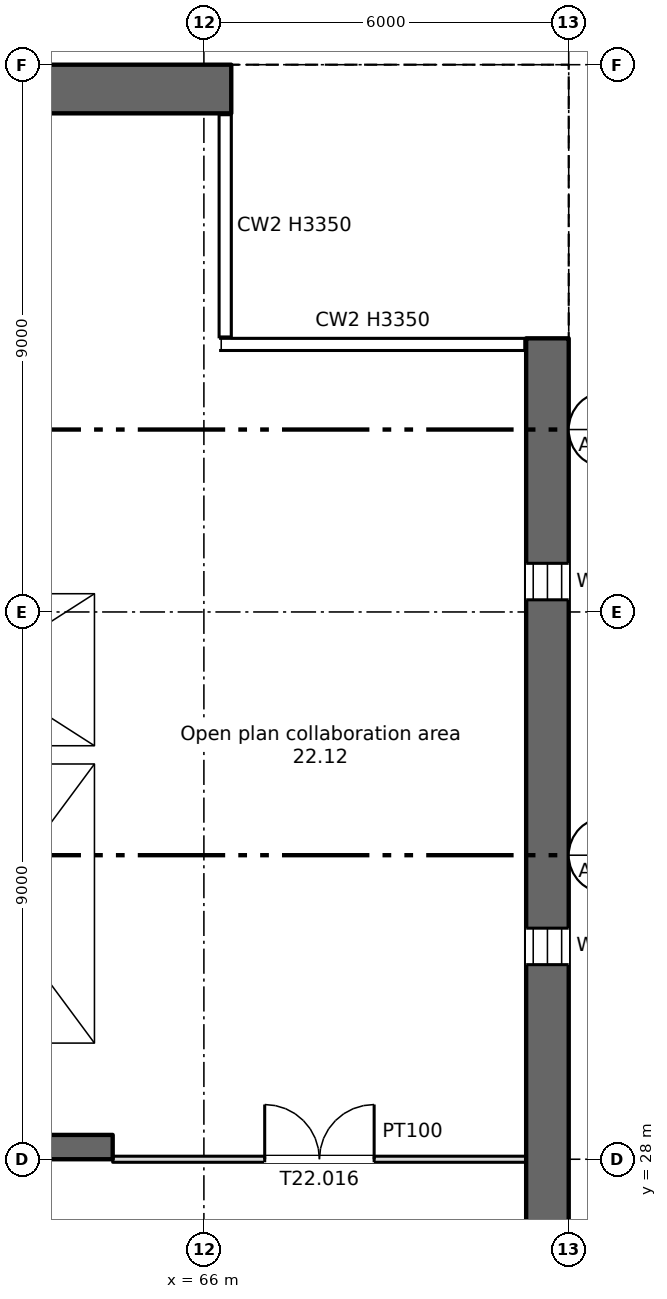
"""IFC4 building model, lengths in metres.
Left out: names, types, materials, properties, quantities, classifications, styles, units other than length and angle.
Written with IfcOpenShell. Run it as: python <this file> out.ifc"""

import sys

from ifc_helpers import new_model, si_unit, direction, frame, frame_2d, origin, place, context, subcontext, project, spatial, rectangle, extrude, element, fill, save


model = new_model("IFC4")
c1 = context("Model", 3, precision=1e-05, world=origin(), true_north=direction((0.0, 1.0)))
c2 = subcontext(c1, "Body", "Model", "MODEL_VIEW")
j1 = project(units=[si_unit("LENGTHUNIT", "METRE"), si_unit("PLANEANGLEUNIT", "RADIAN")], contexts=[c1])
p1 = place(None, origin())
s1 = spatial("IfcSite", under=j1, at=p1, CompositionType="ELEMENT")
p2 = place(p1, origin())
s2 = spatial("IfcBuilding", under=s1, at=p2, CompositionType="ELEMENT")
p3 = place(p2, frame((0.0, 0.0, 143.75)))
s3 = spatial("IfcBuildingStorey", under=s2, at=p3, CompositionType="ELEMENT", Elevation=143.75)
p4 = place(p3, frame((71.65, 6.0, 0.0), z_axis=(0.0, 0.0, 1.0), x_axis=(0.0, 1.0, 0.0)))
e1 = element("IfcWall", 1, at=p4, inside=s3, PredefinedType="SHEAR", context=c2, shape_type="SweptSolid", body=[
    extrude(rectangle(XDim=35.5, YDim=0.7, at=frame_2d((17.75, 0.0))), origin(), (0.0, 0.0, 1.0), 3.35),
])
p5 = place(p4, frame((1.2, 0.0, 0.6)))
e2 = element("IfcOpeningElement", 2, at=p5, cuts=e1, PredefinedType="OPENING", context=c2, shape_type="SweptSolid", body=[
    extrude(rectangle(XDim=0.6, YDim=2.4, at=frame_2d((0.3, 1.2))), frame((0.0, 0.36, 0.0), z_axis=(0.0, -1.0, 0.0), x_axis=(1.0, 0.0, 0.0)), (0.0, 0.0, 1.0), 0.72),
])
p6 = place(p4, frame((7.2, 0.0, 0.6)))
e3 = element("IfcOpeningElement", 3, at=p6, cuts=e1, PredefinedType="OPENING", context=c2, shape_type="SweptSolid", body=[
    extrude(rectangle(XDim=0.6, YDim=2.4, at=frame_2d((0.3, 1.2))), frame((0.0, 0.36, 0.0), z_axis=(0.0, -1.0, 0.0), x_axis=(1.0, 0.0, 0.0)), (0.0, 0.0, 1.0), 0.72),
])
p7 = place(p4, frame((13.2, 0.0, 0.6)))
e4 = element("IfcOpeningElement", 4, at=p7, cuts=e1, PredefinedType="OPENING", context=c2, shape_type="SweptSolid", body=[
    extrude(rectangle(XDim=0.6, YDim=2.4, at=frame_2d((0.3, 1.2))), frame((0.0, 0.36, 0.0), z_axis=(0.0, -1.0, 0.0), x_axis=(1.0, 0.0, 0.0)), (0.0, 0.0, 1.0), 0.72),
])
p8 = place(p4, frame((19.2, 0.0, 0.6)))
e5 = element("IfcOpeningElement", 5, at=p8, cuts=e1, PredefinedType="OPENING", context=c2, shape_type="SweptSolid", body=[
    extrude(rectangle(XDim=0.6, YDim=2.4, at=frame_2d((0.3, 1.2))), frame((0.0, 0.36, 0.0), z_axis=(0.0, -1.0, 0.0), x_axis=(1.0, 0.0, 0.0)), (0.0, 0.0, 1.0), 0.72),
])
p9 = place(p4, frame((25.2, 0.0, 0.6)))
e6 = element("IfcOpeningElement", 6, at=p9, cuts=e1, PredefinedType="OPENING", context=c2, shape_type="SweptSolid", body=[
    extrude(rectangle(XDim=0.6, YDim=2.4, at=frame_2d((0.3, 1.2))), frame((0.0, 0.36, 0.0), z_axis=(0.0, -1.0, 0.0), x_axis=(1.0, 0.0, 0.0)), (0.0, 0.0, 1.0), 0.72),
])
p10 = place(p4, frame((31.2, 0.0, 0.6)))
e7 = element("IfcOpeningElement", 7, at=p10, cuts=e1, PredefinedType="OPENING", context=c2, shape_type="SweptSolid", body=[
    extrude(rectangle(XDim=0.6, YDim=2.4, at=frame_2d((0.3, 1.2))), frame((0.0, 0.36, 0.0), z_axis=(0.0, -1.0, 0.0), x_axis=(1.0, 0.0, 0.0)), (0.0, 0.0, 1.0), 0.72),
])
p11 = place(p3, frame((5.55, 45.6, 0.0), z_axis=(0.0, 0.0, 1.0), x_axis=(1.0, 0.0, 0.0)))
e8 = element("IfcWall", 8, at=p11, inside=s3, PredefinedType="SHEAR", context=c2, shape_type="SweptSolid", body=[
    extrude(rectangle(XDim=60.9, YDim=0.8, at=frame_2d((30.45, 0.0))), origin(), (0.0, 0.0, 1.0), 3.35),
])
p12 = place(p11, frame((1.2, 0.0, 0.6)))
e9 = element("IfcOpeningElement", 9, at=p12, cuts=e8, PredefinedType="OPENING", context=c2, shape_type="SweptSolid", body=[
    extrude(rectangle(XDim=0.6, YDim=2.4, at=frame_2d((0.3, 1.2))), frame((0.0, 0.41, 0.0), z_axis=(0.0, -1.0, 0.0), x_axis=(1.0, 0.0, 0.0)), (0.0, 0.0, 1.0), 0.82),
])
p13 = place(p11, frame((7.2, 0.0, 0.6)))
e10 = element("IfcOpeningElement", 10, at=p13, cuts=e8, PredefinedType="OPENING", context=c2, shape_type="SweptSolid", body=[
    extrude(rectangle(XDim=0.6, YDim=2.4, at=frame_2d((0.3, 1.2))), frame((0.0, 0.41, 0.0), z_axis=(0.0, -1.0, 0.0), x_axis=(1.0, 0.0, 0.0)), (0.0, 0.0, 1.0), 0.82),
])
p14 = place(p3, frame((6.7, 28.2, 0.0), z_axis=(0.0, 0.0, 1.0), x_axis=(1.0, 0.0, 0.0)))
e11 = element("IfcWall", 11, at=p14, inside=s3, PredefinedType="SHEAR", context=c2, shape_type="SweptSolid", body=[
    extrude(rectangle(XDim=57.8, YDim=0.4, at=frame_2d((28.9, 0.0))), origin(), (0.0, 0.0, 1.0), 3.35),
])
p15 = place(p14, frame((13.85, 0.0, 0.0)))
e12 = element("IfcOpeningElement", 12, at=p15, cuts=e11, PredefinedType="OPENING", context=c2, shape_type="SweptSolid", body=[
    extrude(rectangle(XDim=0.9, YDim=2.1, at=frame_2d((0.45, 1.05))), frame((0.0, 0.21, 0.0), z_axis=(0.0, -1.0, 0.0), x_axis=(1.0, 0.0, 0.0)), (0.0, 0.0, 1.0), 0.42),
])
p16 = place(p14, frame((48.562, 0.0, 0.0)))
e13 = element("IfcOpeningElement", 13, at=p16, cuts=e11, PredefinedType="OPENING", context=c2, shape_type="SweptSolid", body=[
    extrude(rectangle(XDim=0.9, YDim=2.1, at=frame_2d((0.45, 1.05))), frame((0.0, 0.21, 0.0), z_axis=(0.0, -1.0, 0.0), x_axis=(1.0, 0.0, 0.0)), (0.0, 0.0, 1.0), 0.42),
])
p17 = place(p14, frame((51.137, 0.0, 0.0)))
e14 = element("IfcOpeningElement", 14, at=p17, cuts=e11, PredefinedType="OPENING", context=c2, shape_type="SweptSolid", body=[
    extrude(rectangle(XDim=0.9, YDim=2.1, at=frame_2d((0.45, 1.05))), frame((0.0, 0.21, 0.0), z_axis=(0.0, -1.0, 0.0), x_axis=(1.0, 0.0, 0.0)), (0.0, 0.0, 1.0), 0.42),
])
p18 = place(p14, frame((1.35, 0.0, 0.0)))
e15 = element("IfcOpeningElement", 15, at=p18, cuts=e11, PredefinedType="OPENING", context=c2, shape_type="SweptSolid", body=[
    extrude(rectangle(XDim=0.9, YDim=2.1, at=frame_2d((0.45, 1.05))), frame((0.0, 0.21, 0.0), z_axis=(0.0, -1.0, 0.0), x_axis=(1.0, 0.0, 0.0)), (0.0, 0.0, 1.0), 0.42),
])
p19 = place(p14, frame((4.7, 0.0, 0.0)))
e16 = element("IfcOpeningElement", 16, at=p19, cuts=e11, PredefinedType="OPENING", context=c2, shape_type="SweptSolid", body=[
    extrude(rectangle(XDim=1.2, YDim=2.1, at=frame_2d((0.6, 1.05))), frame((0.0, 0.21, 0.0), z_axis=(0.0, -1.0, 0.0), x_axis=(1.0, 0.0, 0.0)), (0.0, 0.0, 1.0), 0.42),
])
p20 = place(p14, frame((31.7, 0.0, 0.0)))
e17 = element("IfcOpeningElement", 17, at=p20, cuts=e11, PredefinedType="OPENING", context=c2, shape_type="SweptSolid", body=[
    extrude(rectangle(XDim=1.2, YDim=2.1, at=frame_2d((0.6, 1.05))), frame((0.0, 0.21, 0.0), z_axis=(0.0, -1.0, 0.0), x_axis=(1.0, 0.0, 0.0)), (0.0, 0.0, 1.0), 0.42),
])
p21 = place(p14, frame((55.2, 0.0, 0.0)))
e18 = element("IfcOpeningElement", 18, at=p21, cuts=e11, PredefinedType="OPENING", context=c2, shape_type="SweptSolid", body=[
    extrude(rectangle(XDim=1.2, YDim=2.1, at=frame_2d((0.6, 1.05))), frame((0.0, 0.21, 0.0), z_axis=(0.0, -1.0, 0.0), x_axis=(1.0, 0.0, 0.0)), (0.0, 0.0, 1.0), 0.42),
])
p22 = place(p14, frame((21.7, 0.0, 0.0)))
e19 = element("IfcOpeningElement", 19, at=p22, cuts=e11, PredefinedType="OPENING", context=c2, shape_type="SweptSolid", body=[
    extrude(rectangle(XDim=1.2, YDim=2.1, at=frame_2d((0.6, 1.05))), frame((0.0, 0.21, 0.0), z_axis=(0.0, -1.0, 0.0), x_axis=(1.0, 0.0, 0.0)), (0.0, 0.0, 1.0), 0.42),
])
p23 = place(p14, frame((41.7, 0.0, 0.0)))
e20 = element("IfcOpeningElement", 20, at=p23, cuts=e11, PredefinedType="OPENING", context=c2, shape_type="SweptSolid", body=[
    extrude(rectangle(XDim=1.2, YDim=2.1, at=frame_2d((0.6, 1.05))), frame((0.0, 0.21, 0.0), z_axis=(0.0, -1.0, 0.0), x_axis=(1.0, 0.0, 0.0)), (0.0, 0.0, 1.0), 0.42),
])
p24 = place(p14, frame((24.85, 0.0, 0.0)))
e21 = element("IfcOpeningElement", 21, at=p24, cuts=e11, PredefinedType="OPENING", context=c2, shape_type="SweptSolid", body=[
    extrude(rectangle(XDim=2.4, YDim=2.1, at=frame_2d((1.2, 1.05))), frame((0.0, 0.21, 0.0), z_axis=(0.0, -1.0, 0.0), x_axis=(1.0, 0.0, 0.0)), (0.0, 0.0, 1.0), 0.42),
])
p25 = place(p14, frame((37.35, 0.0, 0.0)))
e22 = element("IfcOpeningElement", 22, at=p25, cuts=e11, PredefinedType="OPENING", context=c2, shape_type="SweptSolid", body=[
    extrude(rectangle(XDim=2.4, YDim=2.1, at=frame_2d((1.2, 1.05))), frame((0.0, 0.21, 0.0), z_axis=(0.0, -1.0, 0.0), x_axis=(1.0, 0.0, 0.0)), (0.0, 0.0, 1.0), 0.42),
])
p26 = place(p14, frame((7.95, 0.0, 0.0)))
e23 = element("IfcOpeningElement", 23, at=p26, cuts=e11, PredefinedType="OPENING", context=c2, shape_type="SweptSolid", body=[
    extrude(rectangle(XDim=2.4, YDim=2.1, at=frame_2d((1.2, 1.05))), frame((0.0, 0.21, 0.0), z_axis=(0.0, -1.0, 0.0), x_axis=(1.0, 0.0, 0.0)), (0.0, 0.0, 1.0), 0.42),
])
p27 = place(p14, frame((28.85, 0.0, 0.0)))
e24 = element("IfcOpeningElement", 24, at=p27, cuts=e11, PredefinedType="OPENING", context=c2, shape_type="SweptSolid", body=[
    extrude(rectangle(XDim=0.9, YDim=2.1, at=frame_2d((0.45, 1.05))), frame((0.0, 0.21, 0.0), z_axis=(0.0, -1.0, 0.0), x_axis=(1.0, 0.0, 0.0)), (0.0, 0.0, 1.0), 0.42),
])
p28 = place(p14, frame((34.85, 0.0, 0.0)))
e25 = element("IfcOpeningElement", 25, at=p28, cuts=e11, PredefinedType="OPENING", context=c2, shape_type="SweptSolid", body=[
    extrude(rectangle(XDim=0.9, YDim=2.1, at=frame_2d((0.45, 1.05))), frame((0.0, 0.21, 0.0), z_axis=(0.0, -1.0, 0.0), x_axis=(1.0, 0.0, 0.0)), (0.0, 0.0, 1.0), 0.42),
])
p29 = place(p3, frame((64.35, 34.8, 0.0), z_axis=(0.0, 0.0, 1.0), x_axis=(0.0, 1.0, 0.0)))
e26 = element("IfcWall", 26, at=p29, inside=s3, PredefinedType="SHEAR", context=c2, shape_type="SweptSolid", body=[
    extrude(rectangle(XDim=10.4, YDim=0.3, at=frame_2d((5.2, 0.0))), origin(), (0.0, 0.0, 1.0), 3.35),
])
p30 = place(p3, frame((64.35, 28.4, 0.0), z_axis=(0.0, 0.0, 1.0), x_axis=(0.0, 1.0, 0.0)))
e27 = element("IfcWall", 27, at=p30, inside=s3, PredefinedType="SHEAR", context=c2, shape_type="SweptSolid", body=[
    extrude(rectangle(XDim=6.1, YDim=0.3, at=frame_2d((3.05, 0.0))), origin(), (0.0, 0.0, 1.0), 3.35),
])
p31 = place(p3, frame((60.3, 34.65, 0.0), z_axis=(0.0, 0.0, 1.0), x_axis=(1.0, 0.0, 0.0)))
e28 = element("IfcWall", 28, at=p31, inside=s3, PredefinedType="SHEAR", context=c2, shape_type="SweptSolid", body=[
    extrude(rectangle(XDim=4.2, YDim=0.3, at=frame_2d((2.1, 0.0))), origin(), (0.0, 0.0, 1.0), 3.35),
])
p32 = place(p3, frame((60.3, 37.45, 0.0), z_axis=(0.0, 0.0, 1.0), x_axis=(1.0, 0.0, 0.0)))
e29 = element("IfcWall", 29, at=p32, inside=s3, PredefinedType="SHEAR", context=c2, shape_type="SweptSolid", body=[
    extrude(rectangle(XDim=3.9, YDim=0.3, at=frame_2d((1.95, 0.0))), origin(), (0.0, 0.0, 1.0), 3.35),
])
p33 = place(p32, frame((1.4, 0.0, 0.0)))
e30 = element("IfcOpeningElement", 30, at=p33, cuts=e29, PredefinedType="OPENING", context=c2, shape_type="SweptSolid", body=[
    extrude(rectangle(XDim=1.1, YDim=2.1, at=frame_2d((0.55, 1.05))), frame((0.0, 0.16, 0.0), z_axis=(0.0, -1.0, 0.0), x_axis=(1.0, 0.0, 0.0)), (0.0, 0.0, 1.0), 0.32),
])
p34 = place(p3, frame((64.5, 28.0, 0.0), z_axis=(0.0, 0.0, 1.0), x_axis=(1.0, 0.0, 0.0)))
e31 = element("IfcWall", 31, at=p34, inside=s3, PredefinedType="PARTITIONING", context=c2, shape_type="SweptSolid", body=[
    extrude(rectangle(XDim=6.8, YDim=0.1, at=frame_2d((3.4, 0.0))), origin(), (0.0, 0.0, 1.0), 3.35),
])
p35 = place(p34, frame((2.5, 0.0, 0.0)))
e32 = element("IfcOpeningElement", 32, at=p35, cuts=e31, PredefinedType="OPENING", context=c2, shape_type="SweptSolid", body=[
    extrude(rectangle(XDim=1.8, YDim=2.1, at=frame_2d((0.9, 1.05))), frame((0.0, 0.06, 0.0), z_axis=(0.0, -1.0, 0.0), x_axis=(1.0, 0.0, 0.0)), (0.0, 0.0, 1.0), 0.12),
])
p36 = place(p9, origin())
e33 = element("IfcWindow", 33, at=p36, inside=s3, PartitioningType="SINGLE_PANEL", PredefinedType="WINDOW", context=c2, shape_type="SweptSolid", body=[
    extrude(rectangle(XDim=0.6, YDim=2.4, at=frame_2d((0.3, 1.2))), frame((0.0, 0.03, 0.0), z_axis=(0.0, -1.0, 0.0), x_axis=(1.0, 0.0, 0.0)), (0.0, 0.0, 1.0), 0.06),
])
fill(e6, e33)
p37 = place(p10, origin())
e34 = element("IfcWindow", 34, at=p37, inside=s3, PartitioningType="SINGLE_PANEL", PredefinedType="WINDOW", context=c2, shape_type="SweptSolid", body=[
    extrude(rectangle(XDim=0.6, YDim=2.4, at=frame_2d((0.3, 1.2))), frame((0.0, 0.03, 0.0), z_axis=(0.0, -1.0, 0.0), x_axis=(1.0, 0.0, 0.0)), (0.0, 0.0, 1.0), 0.06),
])
fill(e7, e34)
p38 = place(p35, origin())
e35 = element("IfcDoor", 35, at=p38, inside=s3, OperationType="DOUBLE_DOOR_SINGLE_SWING", PredefinedType="DOOR", context=c2, shape_type="SweptSolid", body=[
    extrude(rectangle(XDim=1.8, YDim=2.1, at=frame_2d((0.9, 1.05))), frame((0.0, 0.025, 0.0), z_axis=(0.0, -1.0, 0.0), x_axis=(1.0, 0.0, 0.0)), (0.0, 0.0, 1.0), 0.05),
])
fill(e32, e35)
save(model, sys.argv[1])
